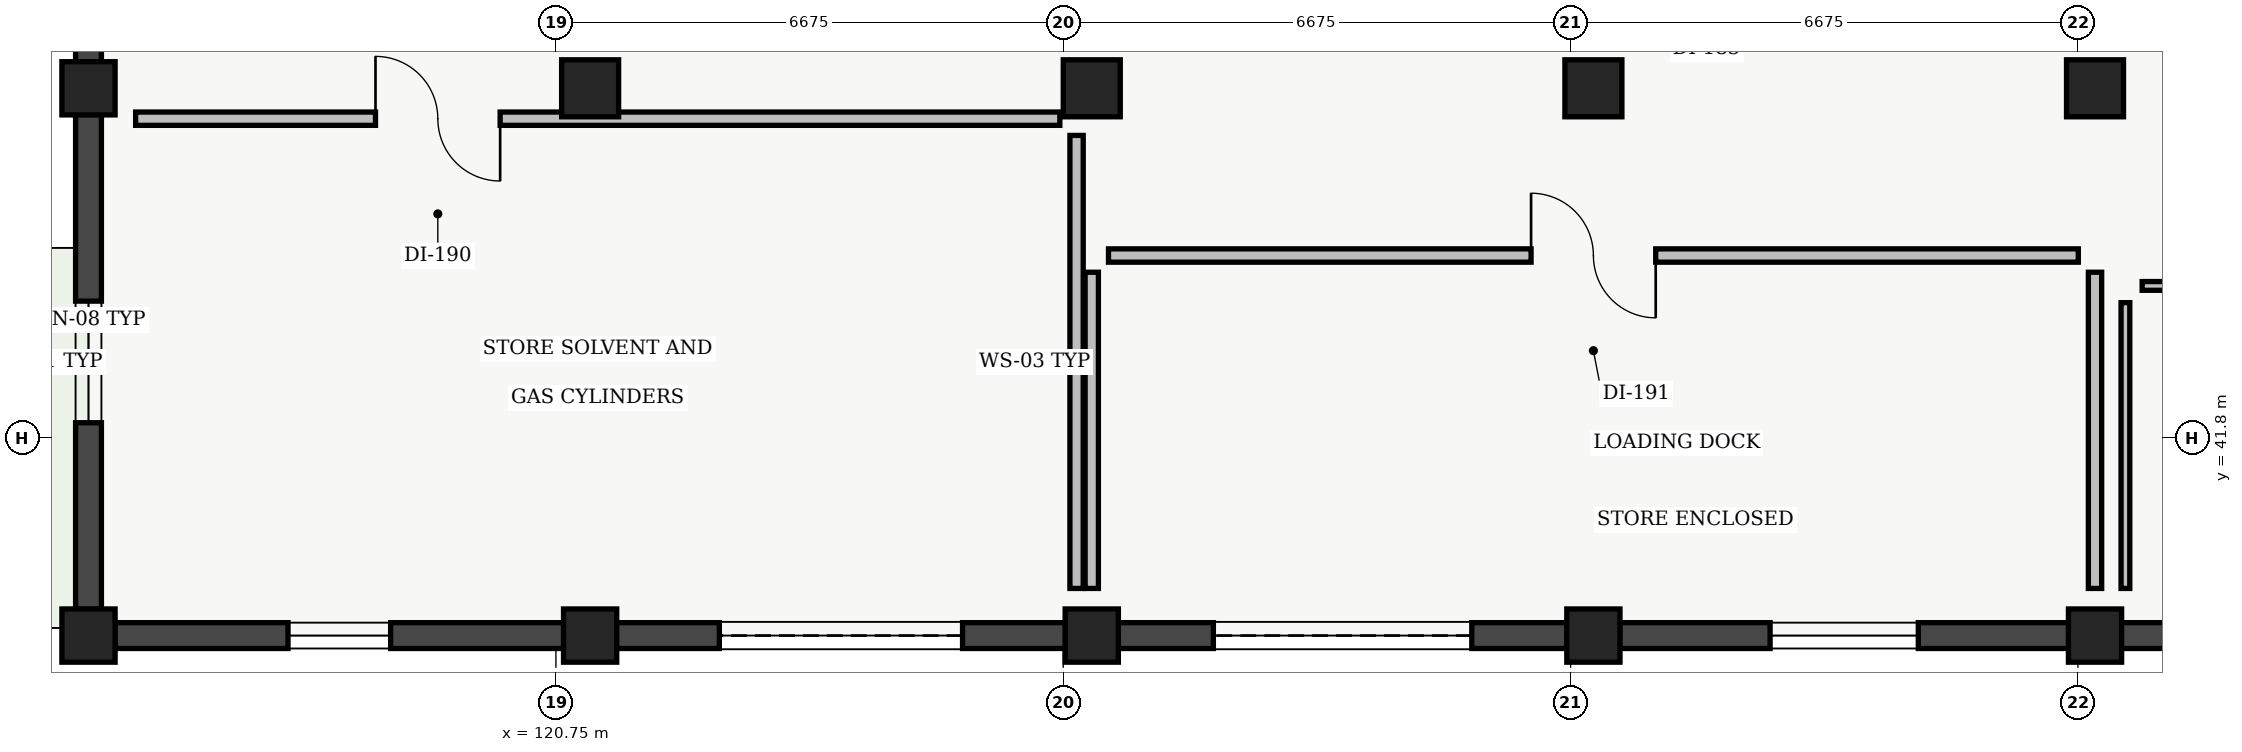
"""IFC4 building model, lengths in metres.
Left out: names, types, materials, properties, quantities, classifications, styles, units other than length and angle.
Written with IfcOpenShell. Run it as: python <this file> out.ifc"""

import sys

from ifc_helpers import new_model, si_unit, direction, frame, frame_2d, origin, origin_2d, place, context, subcontext, project, spatial, rectangle, extrude, element, fill, save


model = new_model("IFC4")
c1 = context("Model", 3, precision=1e-05, world=origin(), true_north=direction((0.0, 1.0)))
c2 = subcontext(c1, "Body", "Model", "MODEL_VIEW")
j1 = project(units=[si_unit("LENGTHUNIT", "METRE"), si_unit("PLANEANGLEUNIT", "RADIAN")], contexts=[c1])
p1 = place(None, origin())
s1 = spatial("IfcSite", under=j1, at=p1, CompositionType="ELEMENT")
p2 = place(p1, origin())
s2 = spatial("IfcBuilding", under=s1, at=p2, CompositionType="ELEMENT")
p3 = place(p2, origin())
s3 = spatial("IfcBuildingStorey", under=s2, at=p3, CompositionType="ELEMENT", Elevation=0.0)
for number, where, z_axis, x_axis in (
    (1, (114.6, 39.2, 0.0), (0.0, 0.0, 1.0), (1.0, 0.0, 0.0)),
    (2, (114.6, 46.4, 0.0), (0.0, 0.0, 1.0), (1.0, 0.0, 0.0)),
    (3, (121.2, 39.2, 0.0), (0.0, 0.0, 1.0), (1.0, 0.0, 0.0)),
):
    element("IfcColumn", number, at=place(p3, frame(where, z_axis=z_axis, x_axis=x_axis)), inside=s3, PredefinedType="COLUMN", context=c2, shape_type="SweptSolid", body=[
        extrude(rectangle(XDim=0.7, YDim=0.7, at=origin_2d()), origin(), (0.0, 0.0, 1.0), 4.9),
    ])
p4 = place(p3, frame((121.2, 46.4, 0.0), z_axis=(0.0, 0.0, 1.0), x_axis=(1.0, 0.0, 0.0)))
e4 = element("IfcColumn", 4, at=p4, inside=s3, PredefinedType="COLUMN", context=c2, shape_type="SweptSolid", body=[
    extrude(rectangle(XDim=0.75, YDim=0.75, at=origin_2d()), origin(), (0.0, 0.0, 1.0), 4.9),
])
p5 = place(p3, frame((127.8, 39.2, 0.0), z_axis=(0.0, 0.0, 1.0), x_axis=(1.0, 0.0, 0.0)))
e5 = element("IfcColumn", 5, at=p5, inside=s3, PredefinedType="COLUMN", context=c2, shape_type="SweptSolid", body=[
    extrude(rectangle(XDim=0.7, YDim=0.7, at=origin_2d()), origin(), (0.0, 0.0, 1.0), 4.9),
])
p6 = place(p3, frame((127.8, 46.4, 0.0), z_axis=(0.0, 0.0, 1.0), x_axis=(1.0, 0.0, 0.0)))
e6 = element("IfcColumn", 6, at=p6, inside=s3, PredefinedType="COLUMN", context=c2, shape_type="SweptSolid", body=[
    extrude(rectangle(XDim=0.75, YDim=0.75, at=origin_2d()), origin(), (0.0, 0.0, 1.0), 4.9),
])
p7 = place(p3, frame((134.4, 39.2, 0.0), z_axis=(0.0, 0.0, 1.0), x_axis=(1.0, 0.0, 0.0)))
e7 = element("IfcColumn", 7, at=p7, inside=s3, PredefinedType="COLUMN", context=c2, shape_type="SweptSolid", body=[
    extrude(rectangle(XDim=0.7, YDim=0.7, at=origin_2d()), origin(), (0.0, 0.0, 1.0), 4.9),
])
p8 = place(p3, frame((134.4, 46.4, 0.0), z_axis=(0.0, 0.0, 1.0), x_axis=(1.0, 0.0, 0.0)))
e8 = element("IfcColumn", 8, at=p8, inside=s3, PredefinedType="COLUMN", context=c2, shape_type="SweptSolid", body=[
    extrude(rectangle(XDim=0.75, YDim=0.75, at=origin_2d()), origin(), (0.0, 0.0, 1.0), 4.9),
])
p9 = place(p3, frame((141.0, 39.2, 0.0), z_axis=(0.0, 0.0, 1.0), x_axis=(1.0, 0.0, 0.0)))
e9 = element("IfcColumn", 9, at=p9, inside=s3, PredefinedType="COLUMN", context=c2, shape_type="SweptSolid", body=[
    extrude(rectangle(XDim=0.7, YDim=0.7, at=origin_2d()), origin(), (0.0, 0.0, 1.0), 4.9),
])
p10 = place(p3, frame((141.0, 46.4, 0.0), z_axis=(0.0, 0.0, 1.0), x_axis=(1.0, 0.0, 0.0)))
e10 = element("IfcColumn", 10, at=p10, inside=s3, PredefinedType="COLUMN", context=c2, shape_type="SweptSolid", body=[
    extrude(rectangle(XDim=0.75, YDim=0.75, at=origin_2d()), origin(), (0.0, 0.0, 1.0), 4.9),
])
p11 = place(p3, frame((114.6, 39.545, 0.0), z_axis=(0.0, 0.0, 1.0), x_axis=(0.0, 1.0, 0.0)))
e11 = element("IfcWall", 11, at=p11, inside=s3, PredefinedType="SOLIDWALL", context=c2, shape_type="SweptSolid", body=[
    extrude(rectangle(XDim=6.51, YDim=0.34, at=frame_2d((3.255, 0.0))), origin(), (0.0, 0.0, 1.0), 4.435),
])
p12 = place(p11, frame((2.455, 0.0, 0.95)))
e12 = element("IfcOpeningElement", 12, at=p12, cuts=e11, PredefinedType="OPENING", context=c2, shape_type="SweptSolid", body=[
    extrude(rectangle(XDim=1.6, YDim=1.4, at=frame_2d((0.8, 0.7))), frame((0.0, 0.17, 0.0), z_axis=(0.0, -1.0, 0.0), x_axis=(1.0, 0.0, 0.0)), (0.0, 0.0, 1.0), 0.34),
])
p13 = place(p3, frame((114.6, 46.745, 0.0), z_axis=(0.0, 0.0, 1.0), x_axis=(0.0, 1.0, 0.0)))
e13 = element("IfcWall", 13, at=p13, inside=s3, PredefinedType="SOLIDWALL", context=c2, shape_type="SweptSolid", body=[
    extrude(rectangle(XDim=6.51, YDim=0.34, at=frame_2d((3.255, 0.0))), origin(), (0.0, 0.0, 1.0), 4.435),
])
p14 = place(p13, frame((2.58, 0.0, 0.95)))
e14 = element("IfcOpeningElement", 14, at=p14, cuts=e13, PredefinedType="OPENING", context=c2, shape_type="SweptSolid", body=[
    extrude(rectangle(XDim=1.35, YDim=1.8, at=frame_2d((0.675, 0.9))), frame((0.0, 0.17, 0.0), z_axis=(0.0, -1.0, 0.0), x_axis=(1.0, 0.0, 0.0)), (0.0, 0.0, 1.0), 0.34),
])
p15 = place(p3, frame((147.255, 39.2, 0.0), z_axis=(0.0, 0.0, 1.0), x_axis=(-1.0, 0.0, 0.0)))
e15 = element("IfcWall", 15, at=p15, inside=s3, PredefinedType="SOLIDWALL", context=c2, shape_type="SweptSolid", body=[
    extrude(rectangle(XDim=5.91, YDim=0.34, at=frame_2d((2.955, 0.0))), origin(), (0.0, 0.0, 1.0), 4.435),
])
p16 = place(p15, frame((2.23, 0.0, 0.95)))
e16 = element("IfcOpeningElement", 16, at=p16, cuts=e15, PredefinedType="OPENING", context=c2, shape_type="SweptSolid", body=[
    extrude(rectangle(XDim=1.45, YDim=1.35, at=frame_2d((0.725, 0.675))), frame((0.0, 0.17, 0.0), z_axis=(0.0, -1.0, 0.0), x_axis=(1.0, 0.0, 0.0)), (0.0, 0.0, 1.0), 0.34),
])
p17 = place(p3, frame((140.655, 39.2, 0.0), z_axis=(0.0, 0.0, 1.0), x_axis=(-1.0, 0.0, 0.0)))
e17 = element("IfcWall", 17, at=p17, inside=s3, PredefinedType="SOLIDWALL", context=c2, shape_type="SweptSolid", body=[
    extrude(rectangle(XDim=5.91, YDim=0.34, at=frame_2d((2.955, 0.0))), origin(), (0.0, 0.0, 1.0), 4.435),
])
p18 = place(p17, frame((1.98, 0.0, 0.95)))
e18 = element("IfcOpeningElement", 18, at=p18, cuts=e17, PredefinedType="OPENING", context=c2, shape_type="SweptSolid", body=[
    extrude(rectangle(XDim=1.95, YDim=1.5, at=frame_2d((0.975, 0.75))), frame((0.0, 0.17, 0.0), z_axis=(0.0, -1.0, 0.0), x_axis=(1.0, 0.0, 0.0)), (0.0, 0.0, 1.0), 0.34),
])
p19 = place(p3, frame((134.055, 39.2, 0.0), z_axis=(0.0, 0.0, 1.0), x_axis=(-1.0, 0.0, 0.0)))
e19 = element("IfcWall", 19, at=p19, inside=s3, PredefinedType="SOLIDWALL", context=c2, shape_type="SweptSolid", body=[
    extrude(rectangle(XDim=5.91, YDim=0.34, at=frame_2d((2.955, 0.0))), origin(), (0.0, 0.0, 1.0), 4.435),
])
p20 = place(p19, frame((1.255, 0.0, 0.0)))
e20 = element("IfcOpeningElement", 20, at=p20, cuts=e19, PredefinedType="OPENING", context=c2, shape_type="SweptSolid", body=[
    extrude(rectangle(XDim=3.4, YDim=3.1, at=frame_2d((1.7, 1.55))), frame((0.0, 0.17, 0.0), z_axis=(0.0, -1.0, 0.0), x_axis=(1.0, 0.0, 0.0)), (0.0, 0.0, 1.0), 0.34),
])
p21 = place(p3, frame((127.455, 39.2, 0.0), z_axis=(0.0, 0.0, 1.0), x_axis=(-1.0, 0.0, 0.0)))
e21 = element("IfcWall", 21, at=p21, inside=s3, PredefinedType="SOLIDWALL", context=c2, shape_type="SweptSolid", body=[
    extrude(rectangle(XDim=5.91, YDim=0.34, at=frame_2d((2.955, 0.0))), origin(), (0.0, 0.0, 1.0), 4.435),
])
p22 = place(p21, frame((1.355, 0.0, 0.0)))
e22 = element("IfcOpeningElement", 22, at=p22, cuts=e21, PredefinedType="OPENING", context=c2, shape_type="SweptSolid", body=[
    extrude(rectangle(XDim=3.2, YDim=3.0, at=frame_2d((1.6, 1.5))), frame((0.0, 0.17, 0.0), z_axis=(0.0, -1.0, 0.0), x_axis=(1.0, 0.0, 0.0)), (0.0, 0.0, 1.0), 0.34),
])
p23 = place(p3, frame((120.855, 39.2, 0.0), z_axis=(0.0, 0.0, 1.0), x_axis=(-1.0, 0.0, 0.0)))
e23 = element("IfcWall", 23, at=p23, inside=s3, PredefinedType="SOLIDWALL", context=c2, shape_type="SweptSolid", body=[
    extrude(rectangle(XDim=5.91, YDim=0.34, at=frame_2d((2.955, 0.0))), origin(), (0.0, 0.0, 1.0), 4.435),
])
p24 = place(p23, frame((2.28, 0.0, 0.95)))
e24 = element("IfcOpeningElement", 24, at=p24, cuts=e23, PredefinedType="OPENING", context=c2, shape_type="SweptSolid", body=[
    extrude(rectangle(XDim=1.35, YDim=1.8, at=frame_2d((0.675, 0.9))), frame((0.0, 0.17, 0.0), z_axis=(0.0, -1.0, 0.0), x_axis=(1.0, 0.0, 0.0)), (0.0, 0.0, 1.0), 0.34),
])
p25 = place(p3, frame((144.18, 43.8, 0.0), z_axis=(0.0, 0.0, 1.0), x_axis=(-1.0, 0.0, 0.0)))
e25 = element("IfcWall", 25, at=p25, inside=s3, PredefinedType="PARTITIONING", context=c2, shape_type="SweptSolid", body=[
    extrude(rectangle(XDim=2.56, YDim=0.115, at=frame_2d((1.28, 0.0))), origin(), (0.0, 0.0, 1.0), 4.55),
])
p26 = place(p25, frame((0.83, 0.0, 0.0)))
e26 = element("IfcOpeningElement", 26, at=p26, cuts=e25, PredefinedType="OPENING", context=c2, shape_type="SweptSolid", body=[
    extrude(rectangle(XDim=0.9, YDim=2.1, at=frame_2d((0.45, 1.05))), frame((0.0, 0.058, 0.0), z_axis=(0.0, -1.0, 0.0), x_axis=(1.0, 0.0, 0.0)), (0.0, 0.0, 1.0), 0.115),
])
p27 = place(p3, frame((141.4, 43.58, 0.0), z_axis=(0.0, 0.0, 1.0), x_axis=(0.0, -1.0, 0.0)))
e27 = element("IfcWall", 27, at=p27, inside=s3, PredefinedType="PARTITIONING", context=c2, shape_type="SweptSolid", body=[
    extrude(rectangle(XDim=3.76, YDim=0.115, at=frame_2d((1.88, 0.0))), origin(), (0.0, 0.0, 1.0), 4.55),
])
p28 = place(p3, frame((127.6, 39.82, 0.0), z_axis=(0.0, 0.0, 1.0), x_axis=(0.0, 1.0, 0.0)))
e28 = element("IfcWall", 28, at=p28, inside=s3, PredefinedType="SOLIDWALL", context=c2, shape_type="SweptSolid", body=[
    extrude(rectangle(XDim=5.96, YDim=0.175, at=frame_2d((2.98, 0.0))), origin(), (0.0, 0.0, 1.0), 4.235),
])
p29 = place(p3, frame((127.38, 46.0, 0.0), z_axis=(0.0, 0.0, 1.0), x_axis=(-1.0, 0.0, 0.0)))
e29 = element("IfcWall", 29, at=p29, inside=s3, PredefinedType="SOLIDWALL", context=c2, shape_type="SweptSolid", body=[
    extrude(rectangle(XDim=12.16, YDim=0.175, at=frame_2d((6.08, 0.0))), origin(), (0.0, 0.0, 1.0), 4.55),
])
p30 = place(p29, frame((7.364, 0.0, 0.0)))
e30 = element("IfcOpeningElement", 30, at=p30, cuts=e29, PredefinedType="OPENING", context=c2, shape_type="SweptSolid", body=[
    extrude(rectangle(XDim=1.64, YDim=2.2, at=frame_2d((0.82, 1.1))), frame((0.0, 0.087, 0.0), z_axis=(0.0, -1.0, 0.0), x_axis=(1.0, 0.0, 0.0)), (0.0, 0.0, 1.0), 0.175),
])
p31 = place(p3, frame((141.0, 39.82, 0.0), z_axis=(0.0, 0.0, 1.0), x_axis=(0.0, 1.0, 0.0)))
e31 = element("IfcWall", 31, at=p31, inside=s3, PredefinedType="SOLIDWALL", context=c2, shape_type="SweptSolid", body=[
    extrude(rectangle(XDim=4.16, YDim=0.175, at=frame_2d((2.08, 0.0))), origin(), (0.0, 0.0, 1.0), 4.235),
])
p32 = place(p3, frame((140.78, 44.2, 0.0), z_axis=(0.0, 0.0, 1.0), x_axis=(-1.0, 0.0, 0.0)))
e32 = element("IfcWall", 32, at=p32, inside=s3, PredefinedType="SOLIDWALL", context=c2, shape_type="SweptSolid", body=[
    extrude(rectangle(XDim=12.76, YDim=0.175, at=frame_2d((6.38, 0.0))), origin(), (0.0, 0.0, 1.0), 4.485),
])
p33 = place(p32, frame((5.56, 0.0, 0.0)))
e33 = element("IfcOpeningElement", 33, at=p33, cuts=e32, PredefinedType="OPENING", context=c2, shape_type="SweptSolid", body=[
    extrude(rectangle(XDim=1.64, YDim=2.2, at=frame_2d((0.82, 1.1))), frame((0.0, 0.087, 0.0), z_axis=(0.0, -1.0, 0.0), x_axis=(1.0, 0.0, 0.0)), (0.0, 0.0, 1.0), 0.175),
])
p34 = place(p3, frame((127.8, 43.98, 0.0), z_axis=(0.0, 0.0, 1.0), x_axis=(0.0, -1.0, 0.0)))
e34 = element("IfcWall", 34, at=p34, inside=s3, PredefinedType="SOLIDWALL", context=c2, shape_type="SweptSolid", body=[
    extrude(rectangle(XDim=4.16, YDim=0.175, at=frame_2d((2.08, 0.0))), origin(), (0.0, 0.0, 1.0), 4.235),
])
p35 = place(p12, origin())
e35 = element("IfcWindow", 35, at=p35, inside=s3, PartitioningType="SINGLE_PANEL", PredefinedType="WINDOW", context=c2, shape_type="SweptSolid", body=[
    extrude(rectangle(XDim=1.6, YDim=1.4, at=frame_2d((0.8, 0.7))), frame((0.0, 0.03, 0.0), z_axis=(0.0, -1.0, 0.0), x_axis=(1.0, 0.0, 0.0)), (0.0, 0.0, 1.0), 0.06),
])
fill(e12, e35)
p36 = place(p18, origin())
e36 = element("IfcWindow", 36, at=p36, inside=s3, PartitioningType="SINGLE_PANEL", PredefinedType="WINDOW", context=c2, shape_type="SweptSolid", body=[
    extrude(rectangle(XDim=1.95, YDim=1.5, at=frame_2d((0.975, 0.75))), frame((0.0, 0.03, 0.0), z_axis=(0.0, -1.0, 0.0), x_axis=(1.0, 0.0, 0.0)), (0.0, 0.0, 1.0), 0.06),
])
fill(e18, e36)
p37 = place(p20, origin())
e37 = element("IfcDoor", 37, at=p37, inside=s3, OperationType="ROLLINGUP", PredefinedType="GATE", context=c2, shape_type="SweptSolid", body=[
    extrude(rectangle(XDim=3.4, YDim=3.1, at=frame_2d((1.7, 1.55))), frame((0.0, 0.025, 0.0), z_axis=(0.0, -1.0, 0.0), x_axis=(1.0, 0.0, 0.0)), (0.0, 0.0, 1.0), 0.05),
])
fill(e20, e37)
p38 = place(p22, origin())
e38 = element("IfcDoor", 38, at=p38, inside=s3, OperationType="ROLLINGUP", PredefinedType="GATE", context=c2, shape_type="SweptSolid", body=[
    extrude(rectangle(XDim=3.2, YDim=3.0, at=frame_2d((1.6, 1.5))), frame((0.0, 0.025, 0.0), z_axis=(0.0, -1.0, 0.0), x_axis=(1.0, 0.0, 0.0)), (0.0, 0.0, 1.0), 0.05),
])
fill(e22, e38)
p39 = place(p24, origin())
e39 = element("IfcWindow", 39, at=p39, inside=s3, PartitioningType="SINGLE_PANEL", PredefinedType="WINDOW", context=c2, shape_type="SweptSolid", body=[
    extrude(rectangle(XDim=1.35, YDim=1.8, at=frame_2d((0.675, 0.9))), frame((0.0, 0.03, 0.0), z_axis=(0.0, -1.0, 0.0), x_axis=(1.0, 0.0, 0.0)), (0.0, 0.0, 1.0), 0.06),
])
fill(e24, e39)
p40 = place(p30, origin())
e40 = element("IfcDoor", 40, at=p40, inside=s3, OperationType="DOUBLE_DOOR_SINGLE_SWING", PredefinedType="DOOR", context=c2, shape_type="SweptSolid", body=[
    extrude(rectangle(XDim=1.64, YDim=2.2, at=frame_2d((0.82, 1.1))), frame((0.0, 0.025, 0.0), z_axis=(0.0, -1.0, 0.0), x_axis=(1.0, 0.0, 0.0)), (0.0, 0.0, 1.0), 0.05),
])
fill(e30, e40)
p41 = place(p33, origin())
e41 = element("IfcDoor", 41, at=p41, inside=s3, OperationType="DOUBLE_DOOR_SINGLE_SWING", PredefinedType="DOOR", context=c2, shape_type="SweptSolid", body=[
    extrude(rectangle(XDim=1.64, YDim=2.2, at=frame_2d((0.82, 1.1))), frame((0.0, 0.025, 0.0), z_axis=(0.0, -1.0, 0.0), x_axis=(1.0, 0.0, 0.0)), (0.0, 0.0, 1.0), 0.05),
])
fill(e33, e41)
save(model, sys.argv[1])
